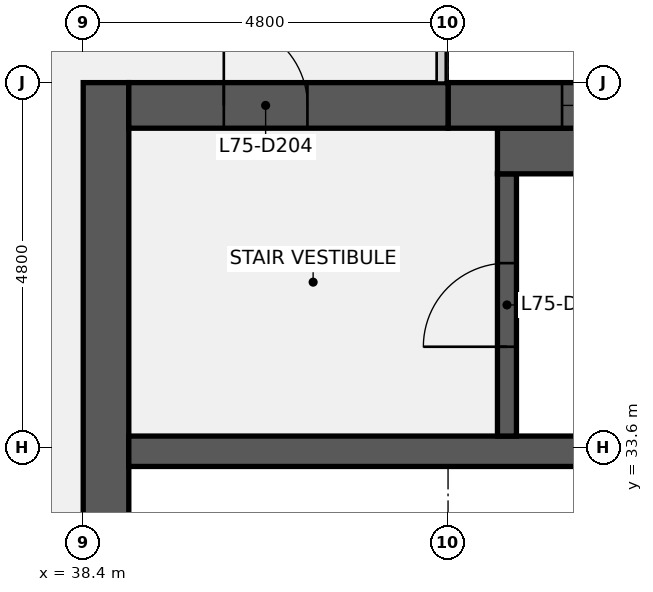
"""IFC4 building model, lengths in metres.
Left out: names, types, materials, properties, quantities, classifications, styles, units other than length and angle.
Written with IfcOpenShell. Run it as: python <this file> out.ifc"""

import sys

from ifc_helpers import new_model, si_unit, direction, frame, frame_2d, origin, place, context, subcontext, project, spatial, rectangle, extrude, element, fill, save


model = new_model("IFC4")
c1 = context("Model", 3, precision=1e-05, world=origin(), true_north=direction((0.0, 1.0)))
c2 = subcontext(c1, "Body", "Model", "MODEL_VIEW")
j1 = project(units=[si_unit("LENGTHUNIT", "METRE"), si_unit("PLANEANGLEUNIT", "RADIAN")], contexts=[c1])
p1 = place(None, origin())
s1 = spatial("IfcSite", under=j1, at=p1, CompositionType="ELEMENT")
p2 = place(p1, origin())
s2 = spatial("IfcBuilding", under=s1, at=p2, CompositionType="ELEMENT")
p3 = place(p2, frame((0.0, 0.0, 338.3)))
s3 = spatial("IfcBuildingStorey", under=s2, at=p3, CompositionType="ELEMENT", Elevation=338.3)
p4 = place(p3, frame((38.7, 9.6, 0.0), z_axis=(0.0, 0.0, 1.0), x_axis=(0.0, 1.0, 0.0)))
e1 = element("IfcWall", 1, at=p4, inside=s3, PredefinedType="SHEAR", context=c2, shape_type="SweptSolid", body=[
    extrude(rectangle(XDim=28.8, YDim=0.6, at=frame_2d((14.4, 0.0))), origin(), (0.0, 0.0, 1.0), 3.84),
])
p5 = place(p4, frame((8.7, 0.0, 0.0)))
e2 = element("IfcOpeningElement", 2, at=p5, cuts=e1, PredefinedType="OPENING", context=c2, shape_type="SweptSolid", body=[
    extrude(rectangle(XDim=1.8, YDim=2.1, at=frame_2d((0.9, 1.05))), frame((0.0, 0.31, 0.0), z_axis=(0.0, -1.0, 0.0), x_axis=(1.0, 0.0, 0.0)), (0.0, 0.0, 1.0), 0.62),
])
p6 = place(p4, frame((18.3, 0.0, 0.0)))
e3 = element("IfcOpeningElement", 3, at=p6, cuts=e1, PredefinedType="OPENING", context=c2, shape_type="SweptSolid", body=[
    extrude(rectangle(XDim=1.8, YDim=2.1, at=frame_2d((0.9, 1.05))), frame((0.0, 0.31, 0.0), z_axis=(0.0, -1.0, 0.0), x_axis=(1.0, 0.0, 0.0)), (0.0, 0.0, 1.0), 0.62),
])
p7 = place(p3, frame((39.0, 33.55, 0.0), z_axis=(0.0, 0.0, 1.0), x_axis=(1.0, 0.0, 0.0)))
e4 = element("IfcWall", 4, at=p7, inside=s3, PredefinedType="SHEAR", context=c2, shape_type="SweptSolid", body=[
    extrude(rectangle(XDim=18.0, YDim=0.4, at=frame_2d((9.0, 0.0))), origin(), (0.0, 0.0, 1.0), 3.84),
])
p8 = place(p3, frame((43.975, 33.75, 0.0), z_axis=(0.0, 0.0, 1.0), x_axis=(0.0, 1.0, 0.0)))
e5 = element("IfcWall", 5, at=p8, inside=s3, PredefinedType="SHEAR", context=c2, shape_type="SweptSolid", body=[
    extrude(rectangle(XDim=3.45, YDim=0.25, at=frame_2d((1.725, 0.0))), origin(), (0.0, 0.0, 1.0), 3.84),
])
p9 = place(p8, frame((1.175, 0.0, 0.0)))
e6 = element("IfcOpeningElement", 6, at=p9, cuts=e5, PredefinedType="OPENING", context=c2, shape_type="SweptSolid", body=[
    extrude(rectangle(XDim=1.1, YDim=2.1, at=frame_2d((0.55, 1.05))), frame((0.0, 0.135, 0.0), z_axis=(0.0, -1.0, 0.0), x_axis=(1.0, 0.0, 0.0)), (0.0, 0.0, 1.0), 0.27),
])
p10 = place(p3, frame((43.85, 37.5, 0.0), z_axis=(0.0, 0.0, 1.0), x_axis=(1.0, 0.0, 0.0)))
e7 = element("IfcWall", 7, at=p10, inside=s3, PredefinedType="SHEAR", context=c2, shape_type="SweptSolid", body=[
    extrude(rectangle(XDim=7.5, YDim=0.6, at=frame_2d((3.75, 0.0))), origin(), (0.0, 0.0, 1.0), 3.84),
])
p11 = place(p3, frame((43.2, 38.1, 0.0), z_axis=(0.0, 0.0, 1.0), x_axis=(1.0, 0.0, 0.0)))
e8 = element("IfcWall", 8, at=p11, inside=s3, PredefinedType="SHEAR", context=c2, shape_type="SweptSolid", body=[
    extrude(rectangle(XDim=13.8, YDim=0.6, at=frame_2d((6.9, 0.0))), origin(), (0.0, 0.0, 1.0), 3.84),
])
p12 = place(p11, frame((6.3, 0.0, 0.9)))
e9 = element("IfcOpeningElement", 9, at=p12, cuts=e8, PredefinedType="OPENING", context=c2, shape_type="SweptSolid", body=[
    extrude(rectangle(XDim=1.8, YDim=1.5, at=frame_2d((0.9, 0.75))), frame((0.0, 0.31, 0.0), z_axis=(0.0, -1.0, 0.0), x_axis=(1.0, 0.0, 0.0)), (0.0, 0.0, 1.0), 0.62),
])
p13 = place(p11, frame((1.5, 0.0, 0.9)))
e10 = element("IfcOpeningElement", 10, at=p13, cuts=e8, PredefinedType="OPENING", context=c2, shape_type="SweptSolid", body=[
    extrude(rectangle(XDim=1.8, YDim=1.5, at=frame_2d((0.9, 0.75))), frame((0.0, 0.31, 0.0), z_axis=(0.0, -1.0, 0.0), x_axis=(1.0, 0.0, 0.0)), (0.0, 0.0, 1.0), 0.62),
])
p14 = place(p3, frame((39.0, 38.1, 0.0), z_axis=(0.0, 0.0, 1.0), x_axis=(1.0, 0.0, 0.0)))
e11 = element("IfcWall", 11, at=p14, inside=s3, PredefinedType="SHEAR", context=c2, shape_type="SweptSolid", body=[
    extrude(rectangle(XDim=4.2, YDim=0.6, at=frame_2d((2.1, 0.0))), origin(), (0.0, 0.0, 1.0), 3.84),
])
p15 = place(p14, frame((1.25, 0.0, 0.0)))
e12 = element("IfcOpeningElement", 12, at=p15, cuts=e11, PredefinedType="OPENING", context=c2, shape_type="SweptSolid", body=[
    extrude(rectangle(XDim=1.1, YDim=2.1, at=frame_2d((0.55, 1.05))), frame((0.0, 0.31, 0.0), z_axis=(0.0, -1.0, 0.0), x_axis=(1.0, 0.0, 0.0)), (0.0, 0.0, 1.0), 0.62),
])
p16 = place(p9, origin())
e13 = element("IfcDoor", 13, at=p16, inside=s3, OperationType="SINGLE_SWING_LEFT", PredefinedType="DOOR", context=c2, shape_type="SweptSolid", body=[
    extrude(rectangle(XDim=1.1, YDim=2.1, at=frame_2d((0.55, 1.05))), frame((0.0, 0.025, 0.0), z_axis=(0.0, -1.0, 0.0), x_axis=(1.0, 0.0, 0.0)), (0.0, 0.0, 1.0), 0.05),
])
fill(e6, e13)
p17 = place(p15, origin())
e14 = element("IfcDoor", 14, at=p17, inside=s3, OperationType="SINGLE_SWING_LEFT", PredefinedType="DOOR", context=c2, shape_type="SweptSolid", body=[
    extrude(rectangle(XDim=1.1, YDim=2.1, at=frame_2d((0.55, 1.05))), frame((0.0, 0.025, 0.0), z_axis=(0.0, -1.0, 0.0), x_axis=(1.0, 0.0, 0.0)), (0.0, 0.0, 1.0), 0.05),
])
fill(e12, e14)
p18 = place(p13, origin())
e15 = element("IfcWindow", 15, at=p18, inside=s3, PartitioningType="SINGLE_PANEL", PredefinedType="WINDOW", context=c2, shape_type="SweptSolid", body=[
    extrude(rectangle(XDim=1.8, YDim=1.5, at=frame_2d((0.9, 0.75))), frame((0.0, 0.03, 0.0), z_axis=(0.0, -1.0, 0.0), x_axis=(1.0, 0.0, 0.0)), (0.0, 0.0, 1.0), 0.06),
])
fill(e10, e15)
save(model, sys.argv[1])
